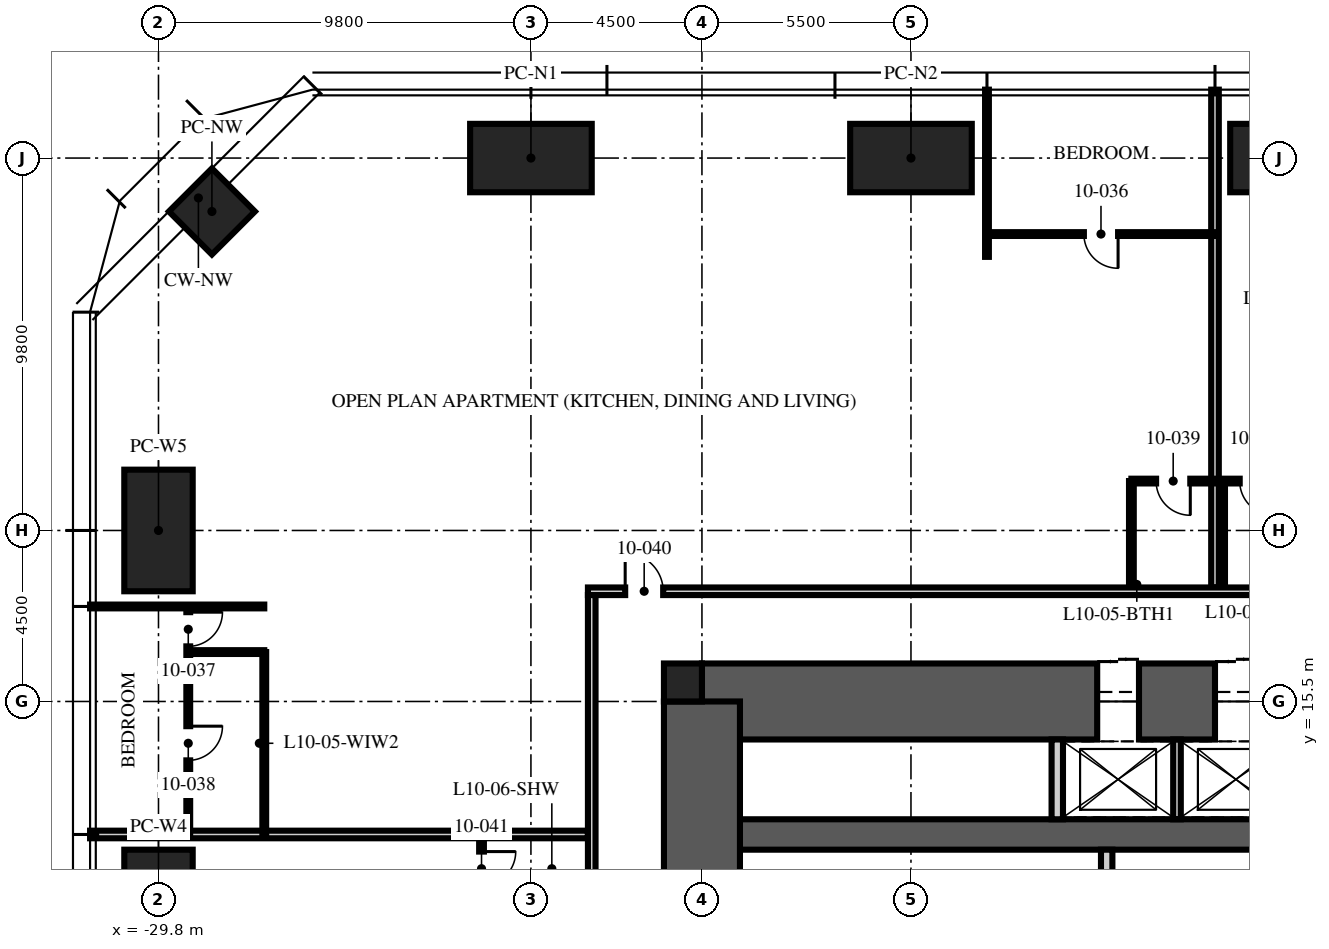
"""IFC4 building model, lengths in metres.
Left out: names, types, materials, properties, quantities, classifications, styles, units other than length and angle.
Written with IfcOpenShell. Run it as: python <this file> out.ifc"""

import sys

from ifc_helpers import new_model, si_unit, direction, frame, frame_2d, origin, origin_2d, place, context, subcontext, project, spatial, rectangle, hollow_rectangle, extrude, element, fill, save


model = new_model("IFC4")
c1 = context("Model", 3, precision=1e-05, world=origin(), true_north=direction((0.0, 1.0)))
c2 = subcontext(c1, "Body", "Model", "MODEL_VIEW")
j1 = project(units=[si_unit("LENGTHUNIT", "METRE"), si_unit("PLANEANGLEUNIT", "RADIAN")], contexts=[c1])
p1 = place(None, origin())
s1 = spatial("IfcSite", under=j1, at=p1, CompositionType="ELEMENT")
p2 = place(p1, origin())
s2 = spatial("IfcBuilding", under=s1, at=p2, CompositionType="ELEMENT")
p3 = place(p2, frame((0.0, 0.0, 43.5)))
s3 = spatial("IfcBuildingStorey", under=s2, at=p3, CompositionType="ELEMENT", Elevation=43.5)
p4 = place(p3, frame((-15.5, 15.5, -0.25), z_axis=(0.0, 0.0, 1.0), x_axis=(1.0, 0.0, 0.0)))
e1 = element("IfcWall", 1, at=p4, inside=s3, PredefinedType="SHEAR", context=c2, shape_type="SweptSolid", body=[
    extrude(rectangle(XDim=31.0, YDim=2.0, at=frame_2d((15.5, 0.0))), origin(), (0.0, 0.0, 1.0), 3.75),
])
p5 = place(p4, frame((10.4, 0.0, 0.25)))
e2 = element("IfcOpeningElement", 2, at=p5, cuts=e1, PredefinedType="OPENING", context=c2, shape_type="SweptSolid", body=[
    extrude(rectangle(XDim=1.1, YDim=2.1, at=frame_2d((0.55, 1.05))), frame((0.0, 1.01, 0.0), z_axis=(0.0, -1.0, 0.0), x_axis=(1.0, 0.0, 0.0)), (0.0, 0.0, 1.0), 2.02),
])
p6 = place(p4, frame((13.5, 0.0, 0.25)))
e3 = element("IfcOpeningElement", 3, at=p6, cuts=e1, PredefinedType="OPENING", context=c2, shape_type="SweptSolid", body=[
    extrude(rectangle(XDim=1.1, YDim=2.1, at=frame_2d((0.55, 1.05))), frame((0.0, 1.01, 0.0), z_axis=(0.0, -1.0, 0.0), x_axis=(1.0, 0.0, 0.0)), (0.0, 0.0, 1.0), 2.02),
])
p7 = place(p4, frame((16.6, 0.0, 0.25)))
e4 = element("IfcOpeningElement", 4, at=p7, cuts=e1, PredefinedType="OPENING", context=c2, shape_type="SweptSolid", body=[
    extrude(rectangle(XDim=1.1, YDim=2.1, at=frame_2d((0.55, 1.05))), frame((0.0, 1.01, 0.0), z_axis=(0.0, -1.0, 0.0), x_axis=(1.0, 0.0, 0.0)), (0.0, 0.0, 1.0), 2.02),
])
p8 = place(p3, frame((-15.5, 12.0, -0.25), z_axis=(0.0, 0.0, 1.0), x_axis=(1.0, 0.0, 0.0)))
e5 = element("IfcWall", 5, at=p8, inside=s3, PredefinedType="SHEAR", context=c2, shape_type="SweptSolid", body=[
    extrude(rectangle(XDim=31.0, YDim=0.8, at=frame_2d((15.5, 0.0))), origin(), (0.0, 0.0, 1.0), 3.75),
])
p9 = place(p3, frame((-15.5, -15.5, -0.25), z_axis=(0.0, 0.0, 1.0), x_axis=(0.0, 1.0, 0.0)))
e6 = element("IfcWall", 6, at=p9, inside=s3, PredefinedType="SHEAR", context=c2, shape_type="SweptSolid", body=[
    extrude(rectangle(XDim=31.0, YDim=2.0, at=frame_2d((15.5, 0.0))), origin(), (0.0, 0.0, 1.0), 3.75),
])
p10 = place(p9, frame((6.5, 0.0, 0.25)))
e7 = element("IfcOpeningElement", 7, at=p10, cuts=e6, PredefinedType="OPENING", context=c2, shape_type="SweptSolid", body=[
    extrude(rectangle(XDim=1.2, YDim=2.1, at=frame_2d((0.6, 1.05))), frame((0.0, 1.01, 0.0), z_axis=(0.0, -1.0, 0.0), x_axis=(1.0, 0.0, 0.0)), (0.0, 0.0, 1.0), 2.02),
])
p11 = place(p9, frame((23.0, 0.0, 0.25)))
e8 = element("IfcOpeningElement", 8, at=p11, cuts=e6, PredefinedType="OPENING", context=c2, shape_type="SweptSolid", body=[
    extrude(rectangle(XDim=1.8, YDim=2.1, at=frame_2d((0.9, 1.05))), frame((0.0, 1.01, 0.0), z_axis=(0.0, -1.0, 0.0), x_axis=(1.0, 0.0, 0.0)), (0.0, 0.0, 1.0), 2.02),
])
p12 = place(p3, frame((-16.0, 16.0, -0.25), z_axis=(0.0, 0.0, 1.0), x_axis=(1.0, 0.0, 0.0)))
e9 = element("IfcColumn", 9, at=p12, inside=s3, PredefinedType="COLUMN", context=c2, shape_type="SweptSolid", body=[
    extrude(rectangle(XDim=1.0, YDim=1.0, at=origin_2d()), origin(), (0.0, 0.0, 1.0), 3.75),
])
for number, where, z_axis, x_axis in (
    (10, (-20.0, 29.8, 0.0), (0.0, 0.0, 1.0), (1.0, 0.0, 0.0)),
    (11, (-10.0, 29.8, 0.0), (0.0, 0.0, 1.0), (1.0, 0.0, 0.0)),
    (12, (0.0, 29.8, 0.0), (0.0, 0.0, 1.0), (1.0, 0.0, 0.0)),
    (13, (-29.8, 10.0, 0.0), (0.0, 0.0, 1.0), (0.0, 1.0, 0.0)),
    (14, (-29.8, 20.0, 0.0), (0.0, 0.0, 1.0), (0.0, 1.0, 0.0)),
):
    element("IfcColumn", number, at=place(p3, frame(where, z_axis=z_axis, x_axis=x_axis)), inside=s3, PredefinedType="COLUMN", context=c2, shape_type="SweptSolid", body=[
        extrude(hollow_rectangle(XDim=3.2, YDim=1.8, WallThickness=0.2, at=origin_2d()), origin(), (0.0, 0.0, 1.0), 3.75),
    ])
p13 = place(p3, frame((-28.394, 28.394, 0.0), z_axis=(0.0, 0.0, 1.0), x_axis=(0.707106781187, 0.707106781187, 0.0)))
e15 = element("IfcColumn", 15, at=p13, inside=s3, PredefinedType="COLUMN", context=c2, shape_type="SweptSolid", body=[
    extrude(hollow_rectangle(XDim=1.6, YDim=1.6, WallThickness=0.1, at=origin_2d()), origin(), (0.0, 0.0, 1.0), 3.75),
])
p14 = place(p3, frame((-6.15, 12.4, 0.0), z_axis=(0.0, 0.0, 1.0), x_axis=(0.0, 1.0, 0.0)))
e16 = element("IfcWall", 16, at=p14, inside=s3, PredefinedType="PARTITIONING", context=c2, shape_type="SweptSolid", body=[
    extrude(rectangle(XDim=2.1, YDim=0.3, at=frame_2d((1.05, 0.0))), origin(), (0.0, 0.0, 1.0), 3.5),
])
p15 = place(p3, frame((-3.0, 12.4, 0.0), z_axis=(0.0, 0.0, 1.0), x_axis=(0.0, 1.0, 0.0)))
e17 = element("IfcWall", 17, at=p15, inside=s3, PredefinedType="PARTITIONING", context=c2, shape_type="SweptSolid", body=[
    extrude(rectangle(XDim=2.1, YDim=0.2, at=frame_2d((1.05, 0.0))), origin(), (0.0, 0.0, 1.0), 3.5),
])
p16 = place(p3, frame((-4.85, 5.3, 0.0), z_axis=(0.0, 0.0, 1.0), x_axis=(0.0, 1.0, 0.0)))
e18 = element("IfcWall", 18, at=p16, inside=s3, PredefinedType="PARTITIONING", context=c2, shape_type="SweptSolid", body=[
    extrude(rectangle(XDim=6.3, YDim=0.3, at=frame_2d((3.15, 0.0))), origin(), (0.0, 0.0, 1.0), 3.5),
])
p17 = place(p16, frame((4.35, 0.0, 0.0)))
e19 = element("IfcOpeningElement", 19, at=p17, cuts=e18, PredefinedType="OPENING", context=c2, shape_type="SweptSolid", body=[
    extrude(rectangle(XDim=0.9, YDim=2.1, at=frame_2d((0.45, 1.05))), frame((0.0, 0.16, 0.0), z_axis=(0.0, -1.0, 0.0), x_axis=(1.0, 0.0, 0.0)), (0.0, 0.0, 1.0), 0.32),
])
p18 = place(p3, frame((-2.0, 18.5, 0.0), z_axis=(0.0, 0.0, 1.0), x_axis=(0.0, 1.0, 0.0)))
e20 = element("IfcWall", 20, at=p18, inside=s3, PredefinedType="PARTITIONING", context=c2, shape_type="SweptSolid", body=[
    extrude(rectangle(XDim=13.1, YDim=0.2, at=frame_2d((6.55, 0.0))), origin(), (0.0, 0.0, 1.0), 2.71),
])
p19 = place(p3, frame((-8.0, 27.2, 0.0), z_axis=(0.0, 0.0, 1.0), x_axis=(0.0, 1.0, 0.0)))
e21 = element("IfcWall", 21, at=p19, inside=s3, PredefinedType="PARTITIONING", context=c2, shape_type="SweptSolid", body=[
    extrude(rectangle(XDim=4.4, YDim=0.1, at=frame_2d((2.2, 0.0))), origin(), (0.0, 0.0, 1.0), 2.71),
])
p20 = place(p3, frame((-27.017, 18.0, 0.0), z_axis=(0.0, 0.0, 1.0), x_axis=(-1.0, 0.0, 0.0)))
e22 = element("IfcWall", 22, at=p20, inside=s3, PredefinedType="PARTITIONING", context=c2, shape_type="SweptSolid", body=[
    extrude(rectangle(XDim=4.583, YDim=0.1, at=frame_2d((2.292, 0.0))), origin(), (0.0, 0.0, 1.0), 2.71),
])
p21 = place(p3, frame((-18.5, 12.0, 0.0), z_axis=(0.0, 0.0, 1.0), x_axis=(-1.0, 0.0, 0.0)))
e23 = element("IfcWall", 23, at=p21, inside=s3, PredefinedType="PARTITIONING", context=c2, shape_type="SweptSolid", body=[
    extrude(rectangle(XDim=13.1, YDim=0.2, at=frame_2d((6.55, 0.0))), origin(), (0.0, 0.0, 1.0), 2.71),
])
p22 = place(p3, frame((0.0, 21.3, 0.0), z_axis=(0.0, 0.0, 1.0), x_axis=(-1.0, 0.0, 0.0)))
e24 = element("IfcWall", 24, at=p22, inside=s3, PredefinedType="PARTITIONING", context=c2, shape_type="SweptSolid", body=[
    extrude(rectangle(XDim=1.8, YDim=0.125, at=frame_2d((0.9, 0.0))), origin(), (0.0, 0.0, 1.0), 2.492),
])
p23 = place(p22, frame((0.45, 0.0, 0.0)))
e25 = element("IfcOpeningElement", 25, at=p23, cuts=e24, PredefinedType="OPENING", context=c2, shape_type="SweptSolid", body=[
    extrude(rectangle(XDim=0.9, YDim=2.1, at=frame_2d((0.45, 1.05))), frame((0.0, 0.073, 0.0), z_axis=(0.0, -1.0, 0.0), x_axis=(1.0, 0.0, 0.0)), (0.0, 0.0, 1.0), 0.145),
])
p24 = place(p3, frame((-1.8, 18.5, 0.0), z_axis=(0.0, 0.0, 1.0), x_axis=(0.0, 1.0, 0.0)))
e26 = element("IfcWall", 26, at=p24, inside=s3, PredefinedType="PARTITIONING", context=c2, shape_type="SweptSolid", body=[
    extrude(rectangle(XDim=2.8, YDim=0.125, at=frame_2d((1.4, 0.0))), origin(), (0.0, 0.0, 1.0), 3.5),
])
p25 = place(p3, frame((-2.0, 27.8, 0.0), z_axis=(0.0, 0.0, 1.0), x_axis=(-1.0, 0.0, 0.0)))
e27 = element("IfcWall", 27, at=p25, inside=s3, PredefinedType="PARTITIONING", context=c2, shape_type="SweptSolid", body=[
    extrude(rectangle(XDim=6.0, YDim=0.1, at=frame_2d((3.0, 0.0))), origin(), (0.0, 0.0, 1.0), 2.61),
])
p26 = place(p25, frame((2.55, 0.0, 0.0)))
e28 = element("IfcOpeningElement", 28, at=p26, cuts=e27, PredefinedType="OPENING", context=c2, shape_type="SweptSolid", body=[
    extrude(rectangle(XDim=0.9, YDim=2.1, at=frame_2d((0.45, 1.05))), frame((0.0, 0.06, 0.0), z_axis=(0.0, -1.0, 0.0), x_axis=(1.0, 0.0, 0.0)), (0.0, 0.0, 1.0), 0.12),
])
p27 = place(p3, frame((-29.017, 18.0, 0.0), z_axis=(0.0, 0.0, 1.0), x_axis=(0.0, -1.0, 0.0)))
e29 = element("IfcWall", 29, at=p27, inside=s3, PredefinedType="PARTITIONING", context=c2, shape_type="SweptSolid", body=[
    extrude(rectangle(XDim=6.0, YDim=0.1, at=frame_2d((3.0, 0.0))), origin(), (0.0, 0.0, 1.0), 2.61),
])
p28 = place(p27, frame((0.15, 0.0, 0.0)))
e30 = element("IfcOpeningElement", 30, at=p28, cuts=e29, PredefinedType="OPENING", context=c2, shape_type="SweptSolid", body=[
    extrude(rectangle(XDim=0.9, YDim=2.1, at=frame_2d((0.45, 1.05))), frame((0.0, 0.06, 0.0), z_axis=(0.0, -1.0, 0.0), x_axis=(1.0, 0.0, 0.0)), (0.0, 0.0, 1.0), 0.12),
])
p29 = place(p27, frame((3.15, 0.0, 0.0)))
e31 = element("IfcOpeningElement", 31, at=p29, cuts=e29, PredefinedType="OPENING", context=c2, shape_type="SweptSolid", body=[
    extrude(rectangle(XDim=0.9, YDim=2.1, at=frame_2d((0.45, 1.05))), frame((0.0, 0.06, 0.0), z_axis=(0.0, -1.0, 0.0), x_axis=(1.0, 0.0, 0.0)), (0.0, 0.0, 1.0), 0.12),
])
p30 = place(p3, frame((-27.017, 16.8, 0.0), z_axis=(0.0, 0.0, 1.0), x_axis=(-1.0, 0.0, 0.0)))
e32 = element("IfcWall", 32, at=p30, inside=s3, PredefinedType="PARTITIONING", context=c2, shape_type="SweptSolid", body=[
    extrude(rectangle(XDim=2.0, YDim=0.1, at=frame_2d((1.0, 0.0))), origin(), (0.0, 0.0, 1.0), 3.5),
])
p31 = place(p3, frame((-27.017, 16.8, 0.0), z_axis=(0.0, 0.0, 1.0), x_axis=(0.0, -1.0, 0.0)))
e33 = element("IfcWall", 33, at=p31, inside=s3, PredefinedType="PARTITIONING", context=c2, shape_type="SweptSolid", body=[
    extrude(rectangle(XDim=4.8, YDim=0.1, at=frame_2d((2.4, 0.0))), origin(), (0.0, 0.0, 1.0), 2.61),
])
p32 = place(p3, frame((-2.0, 21.3, 0.0), z_axis=(0.0, 0.0, 1.0), x_axis=(-1.0, 0.0, 0.0)))
e34 = element("IfcWall", 34, at=p32, inside=s3, PredefinedType="PARTITIONING", context=c2, shape_type="SweptSolid", body=[
    extrude(rectangle(XDim=2.2, YDim=0.125, at=frame_2d((1.1, 0.0))), origin(), (0.0, 0.0, 1.0), 3.5),
])
p33 = place(p32, frame((0.65, 0.0, 0.0)))
e35 = element("IfcOpeningElement", 35, at=p33, cuts=e34, PredefinedType="OPENING", context=c2, shape_type="SweptSolid", body=[
    extrude(rectangle(XDim=0.9, YDim=2.1, at=frame_2d((0.45, 1.05))), frame((0.0, 0.073, 0.0), z_axis=(0.0, -1.0, 0.0), x_axis=(1.0, 0.0, 0.0)), (0.0, 0.0, 1.0), 0.145),
])
p34 = place(p3, frame((-4.2, 18.5, 0.0), z_axis=(0.0, 0.0, 1.0), x_axis=(0.0, 1.0, 0.0)))
e36 = element("IfcWall", 36, at=p34, inside=s3, PredefinedType="PARTITIONING", context=c2, shape_type="SweptSolid", body=[
    extrude(rectangle(XDim=2.8, YDim=0.125, at=frame_2d((1.4, 0.0))), origin(), (0.0, 0.0, 1.0), 3.5),
])
p35 = place(p3, frame((-21.3, 12.0, 0.0), z_axis=(0.0, 0.0, 1.0), x_axis=(0.0, -1.0, 0.0)))
e37 = element("IfcWall", 37, at=p35, inside=s3, PredefinedType="PARTITIONING", context=c2, shape_type="SweptSolid", body=[
    extrude(rectangle(XDim=1.8, YDim=0.125, at=frame_2d((0.9, 0.0))), origin(), (0.0, 0.0, 1.0), 3.5),
])
p36 = place(p35, frame((0.45, 0.0, 0.0)))
e38 = element("IfcOpeningElement", 38, at=p36, cuts=e37, PredefinedType="OPENING", context=c2, shape_type="SweptSolid", body=[
    extrude(rectangle(XDim=0.9, YDim=2.1, at=frame_2d((0.45, 1.05))), frame((0.0, 0.073, 0.0), z_axis=(0.0, -1.0, 0.0), x_axis=(1.0, 0.0, 0.0)), (0.0, 0.0, 1.0), 0.145),
])
p37 = place(p3, frame((-18.5, 18.4, 0.0), z_axis=(0.0, 0.0, 1.0), x_axis=(1.0, 0.0, 0.0)))
e39 = element("IfcWall", 39, at=p37, inside=s3, PredefinedType="PARTITIONING", context=c2, shape_type="SweptSolid", body=[
    extrude(rectangle(XDim=18.5, YDim=0.2, at=frame_2d((9.25, 0.0))), origin(), (0.0, 0.0, 1.0), 2.3),
])
p38 = place(p37, frame((0.98, 0.0, 0.0)))
e40 = element("IfcOpeningElement", 40, at=p38, cuts=e39, PredefinedType="OPENING", context=c2, shape_type="SweptSolid", body=[
    extrude(rectangle(XDim=1.0, YDim=2.2, at=frame_2d((0.5, 1.1))), frame((0.0, 0.11, 0.0), z_axis=(0.0, -1.0, 0.0), x_axis=(1.0, 0.0, 0.0)), (0.0, 0.0, 1.0), 0.22),
])
p39 = place(p3, frame((-18.4, 18.3, 0.0), z_axis=(0.0, 0.0, 1.0), x_axis=(0.0, -1.0, 0.0)))
e41 = element("IfcWall", 41, at=p39, inside=s3, PredefinedType="PARTITIONING", context=c2, shape_type="SweptSolid", body=[
    extrude(rectangle(XDim=36.6, YDim=0.2, at=frame_2d((18.3, 0.0))), origin(), (0.0, 0.0, 1.0), 2.3),
])
p40 = place(p39, frame((8.87, 0.0, 0.0)))
e42 = element("IfcOpeningElement", 42, at=p40, cuts=e41, PredefinedType="OPENING", context=c2, shape_type="SweptSolid", body=[
    extrude(rectangle(XDim=1.0, YDim=2.2, at=frame_2d((0.5, 1.1))), frame((0.0, 0.11, 0.0), z_axis=(0.0, -1.0, 0.0), x_axis=(1.0, 0.0, 0.0)), (0.0, 0.0, 1.0), 0.22),
])
p41 = place(p39, frame((18.57, 0.0, 0.0)))
e43 = element("IfcOpeningElement", 43, at=p41, cuts=e41, PredefinedType="OPENING", context=c2, shape_type="SweptSolid", body=[
    extrude(rectangle(XDim=1.0, YDim=2.2, at=frame_2d((0.5, 1.1))), frame((0.0, 0.11, 0.0), z_axis=(0.0, -1.0, 0.0), x_axis=(1.0, 0.0, 0.0)), (0.0, 0.0, 1.0), 0.22),
])
p42 = place(p5, origin())
e44 = element("IfcDoor", 44, at=p42, inside=s3, OperationType="DOUBLE_DOOR_SLIDING", PredefinedType="DOOR", context=c2, shape_type="SweptSolid", body=[
    extrude(rectangle(XDim=1.1, YDim=2.1, at=frame_2d((0.55, 1.05))), frame((0.0, 0.025, 0.0), z_axis=(0.0, -1.0, 0.0), x_axis=(1.0, 0.0, 0.0)), (0.0, 0.0, 1.0), 0.05),
])
fill(e2, e44)
p43 = place(p6, origin())
e45 = element("IfcDoor", 45, at=p43, inside=s3, OperationType="DOUBLE_DOOR_SLIDING", PredefinedType="DOOR", context=c2, shape_type="SweptSolid", body=[
    extrude(rectangle(XDim=1.1, YDim=2.1, at=frame_2d((0.55, 1.05))), frame((0.0, 0.025, 0.0), z_axis=(0.0, -1.0, 0.0), x_axis=(1.0, 0.0, 0.0)), (0.0, 0.0, 1.0), 0.05),
])
fill(e3, e45)
p44 = place(p23, origin())
e46 = element("IfcDoor", 46, at=p44, inside=s3, OperationType="SINGLE_SWING_LEFT", PredefinedType="DOOR", context=c2, shape_type="SweptSolid", body=[
    extrude(rectangle(XDim=0.9, YDim=2.1, at=frame_2d((0.45, 1.05))), frame((0.0, 0.025, 0.0), z_axis=(0.0, -1.0, 0.0), x_axis=(1.0, 0.0, 0.0)), (0.0, 0.0, 1.0), 0.05),
])
fill(e25, e46)
p45 = place(p26, origin())
e47 = element("IfcDoor", 47, at=p45, inside=s3, OperationType="SINGLE_SWING_LEFT", PredefinedType="DOOR", context=c2, shape_type="SweptSolid", body=[
    extrude(rectangle(XDim=0.9, YDim=2.1, at=frame_2d((0.45, 1.05))), frame((0.0, 0.025, 0.0), z_axis=(0.0, -1.0, 0.0), x_axis=(1.0, 0.0, 0.0)), (0.0, 0.0, 1.0), 0.05),
])
fill(e28, e47)
p46 = place(p28, origin())
e48 = element("IfcDoor", 48, at=p46, inside=s3, OperationType="SINGLE_SWING_LEFT", PredefinedType="DOOR", context=c2, shape_type="SweptSolid", body=[
    extrude(rectangle(XDim=0.9, YDim=2.1, at=frame_2d((0.45, 1.05))), frame((0.0, 0.025, 0.0), z_axis=(0.0, -1.0, 0.0), x_axis=(1.0, 0.0, 0.0)), (0.0, 0.0, 1.0), 0.05),
])
fill(e30, e48)
p47 = place(p29, origin())
e49 = element("IfcDoor", 49, at=p47, inside=s3, OperationType="SINGLE_SWING_LEFT", PredefinedType="DOOR", context=c2, shape_type="SweptSolid", body=[
    extrude(rectangle(XDim=0.9, YDim=2.1, at=frame_2d((0.45, 1.05))), frame((0.0, 0.025, 0.0), z_axis=(0.0, -1.0, 0.0), x_axis=(1.0, 0.0, 0.0)), (0.0, 0.0, 1.0), 0.05),
])
fill(e31, e49)
p48 = place(p33, origin())
e50 = element("IfcDoor", 50, at=p48, inside=s3, OperationType="SINGLE_SWING_LEFT", PredefinedType="DOOR", context=c2, shape_type="SweptSolid", body=[
    extrude(rectangle(XDim=0.9, YDim=2.1, at=frame_2d((0.45, 1.05))), frame((0.0, 0.025, 0.0), z_axis=(0.0, -1.0, 0.0), x_axis=(1.0, 0.0, 0.0)), (0.0, 0.0, 1.0), 0.05),
])
fill(e35, e50)
p49 = place(p38, origin())
e51 = element("IfcDoor", 51, at=p49, inside=s3, OperationType="SINGLE_SWING_LEFT", PredefinedType="DOOR", context=c2, shape_type="SweptSolid", body=[
    extrude(rectangle(XDim=1.0, YDim=2.2, at=frame_2d((0.5, 1.1))), frame((0.0, 0.025, 0.0), z_axis=(0.0, -1.0, 0.0), x_axis=(1.0, 0.0, 0.0)), (0.0, 0.0, 1.0), 0.05),
])
fill(e40, e51)
p50 = place(p36, origin())
e52 = element("IfcDoor", 52, at=p50, inside=s3, OperationType="SINGLE_SWING_LEFT", PredefinedType="DOOR", context=c2, shape_type="SweptSolid", body=[
    extrude(rectangle(XDim=0.9, YDim=2.1, at=frame_2d((0.45, 1.05))), frame((0.0, 0.025, 0.0), z_axis=(0.0, -1.0, 0.0), x_axis=(1.0, 0.0, 0.0)), (0.0, 0.0, 1.0), 0.05),
])
fill(e38, e52)
save(model, sys.argv[1])
